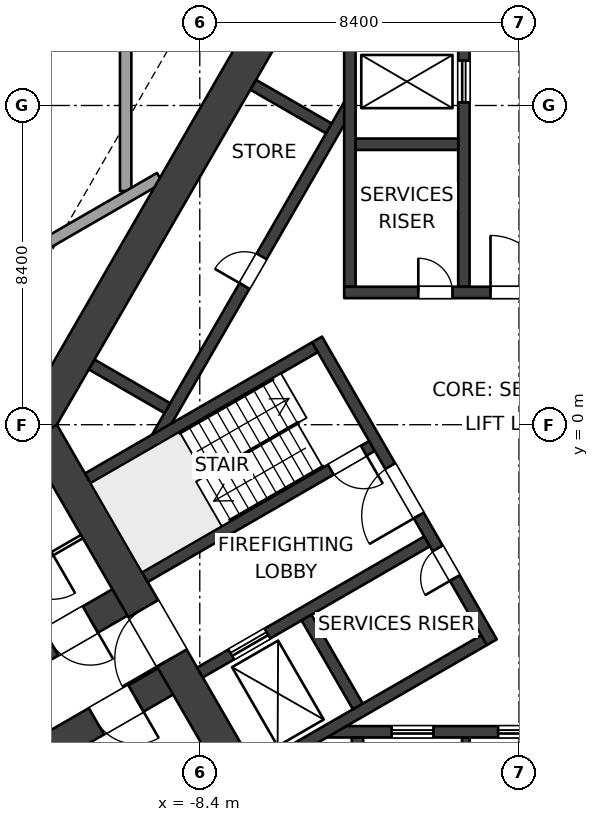
"""IFC4 building model, lengths in metres.
Left out: names, types, materials, properties, quantities, classifications, styles, units other than length and angle.
Written with IfcOpenShell. Run it as: python <this file> out.ifc"""

import sys

from ifc_helpers import new_model, si_unit, direction, frame, frame_2d, origin, place, context, subcontext, project, spatial, polyline, rectangle, outline, extrude, element, fill, save


model = new_model("IFC4")
c1 = context("Model", 3, precision=1e-05, world=origin(), true_north=direction((0.0, 1.0)))
c2 = subcontext(c1, "Body", "Model", "MODEL_VIEW")
j1 = project(units=[si_unit("LENGTHUNIT", "METRE"), si_unit("PLANEANGLEUNIT", "RADIAN")], contexts=[c1])
p1 = place(None, origin())
s1 = spatial("IfcSite", under=j1, at=p1, CompositionType="ELEMENT")
p2 = place(p1, origin())
s2 = spatial("IfcBuilding", under=s1, at=p2, CompositionType="ELEMENT")
p3 = place(p2, frame((0.0, 0.0, -10.5)))
s3 = spatial("IfcBuildingStorey", under=s2, at=p3, CompositionType="ELEMENT", Elevation=-10.5)
p4 = place(p3, frame((-6.47, -10.757, 0.0), z_axis=(0.0, 0.0, 1.0), x_axis=(-0.499997612506, 0.8660267822, 0.0)))
e1 = element("IfcWall", 1, at=p4, inside=s3, PredefinedType="SHEAR", context=c2, shape_type="SweptSolid", body=[
    extrude(rectangle(XDim=12.161, YDim=0.9, at=frame_2d((6.08, 0.0))), origin(), (0.0, 0.0, 1.0), 3.5),
])
p5 = place(p4, frame((5.33, 0.0, 0.0)))
e2 = element("IfcOpeningElement", 2, at=p5, cuts=e1, PredefinedType="OPENING", context=c2, shape_type="SweptSolid", body=[
    extrude(rectangle(XDim=1.5, YDim=2.1, at=frame_2d((0.75, 1.05))), frame((0.0, 0.46, 0.0), z_axis=(0.0, -1.0, 0.0), x_axis=(1.0, 0.0, 0.0)), (0.0, 0.0, 1.0), 0.92),
])
p6 = place(p3, origin())
e3 = element("IfcWall", 3, at=p6, inside=s3, PredefinedType="SHEAR", context=c2, shape_type="SweptSolid", body=[
    extrude(outline(polyline([(-6.6, 11.432), (-13.2, 0.0), (-12.94, -0.45), (-12.161, 0.0), (-6.08, 10.531), (-6.08, 11.432), (-6.6, 11.432)])), origin(), (0.0, 0.0, 1.0), 3.5),
])
p7 = place(p3, frame((-4.6, 3.48, 0.0), z_axis=(0.0, 0.0, 1.0), x_axis=(1.0, 0.0, 0.0)))
e4 = element("IfcWall", 4, at=p7, inside=s3, PredefinedType="SHEAR", context=c2, shape_type="SweptSolid", body=[
    extrude(rectangle(XDim=9.2, YDim=0.3, at=frame_2d((4.6, 0.0))), origin(), (0.0, 0.0, 1.0), 3.5),
])
p8 = place(p7, frame((3.85, 0.0, 0.0)))
e5 = element("IfcOpeningElement", 5, at=p8, cuts=e4, PredefinedType="OPENING", context=c2, shape_type="SweptSolid", body=[
    extrude(rectangle(XDim=1.5, YDim=2.1, at=frame_2d((0.75, 1.05))), frame((0.0, 0.16, 0.0), z_axis=(0.0, -1.0, 0.0), x_axis=(1.0, 0.0, 0.0)), (0.0, 0.0, 1.0), 0.32),
])
p9 = place(p7, frame((1.95, 0.0, 0.0)))
e6 = element("IfcOpeningElement", 6, at=p9, cuts=e4, PredefinedType="OPENING", context=c2, shape_type="SweptSolid", body=[
    extrude(rectangle(XDim=0.9, YDim=2.1, at=frame_2d((0.45, 1.05))), frame((0.0, 0.16, 0.0), z_axis=(0.0, -1.0, 0.0), x_axis=(1.0, 0.0, 0.0)), (0.0, 0.0, 1.0), 0.32),
])
p10 = place(p3, frame((-1.45, 3.63, 0.0), z_axis=(0.0, 0.0, 1.0), x_axis=(0.0, 1.0, 0.0)))
e7 = element("IfcWall", 7, at=p10, inside=s3, PredefinedType="SHEAR", context=c2, shape_type="SweptSolid", body=[
    extrude(rectangle(XDim=6.902, YDim=0.3, at=frame_2d((3.451, 0.0))), origin(), (0.0, 0.0, 1.0), 3.5),
])
p11 = place(p10, frame((4.85, 0.0, 0.0)))
e8 = element("IfcOpeningElement", 8, at=p11, cuts=e7, PredefinedType="OPENING", context=c2, shape_type="SweptSolid", body=[
    extrude(rectangle(XDim=1.1, YDim=2.1, at=frame_2d((0.55, 1.05))), frame((0.0, 0.16, 0.0), z_axis=(0.0, -1.0, 0.0), x_axis=(1.0, 0.0, 0.0)), (0.0, 0.0, 1.0), 0.32),
])
p12 = place(p3, frame((-4.45, 3.63, 0.0), z_axis=(0.0, 0.0, 1.0), x_axis=(0.0, 1.0, 0.0)))
e9 = element("IfcWall", 9, at=p12, inside=s3, PredefinedType="SHEAR", context=c2, shape_type="SweptSolid", body=[
    extrude(rectangle(XDim=6.902, YDim=0.3, at=frame_2d((3.451, 0.0))), origin(), (0.0, 0.0, 1.0), 3.5),
])
p13 = place(p3, frame((-4.3, 7.38, 0.0), z_axis=(0.0, 0.0, 1.0), x_axis=(1.0, 0.0, 0.0)))
e10 = element("IfcWall", 10, at=p13, inside=s3, PredefinedType="SHEAR", context=c2, shape_type="SweptSolid", body=[
    extrude(rectangle(XDim=2.7, YDim=0.3, at=frame_2d((1.35, 0.0))), origin(), (0.0, 0.0, 1.0), 3.5),
])
p14 = place(p3, frame((-0.714, -5.724, 0.0), z_axis=(0.0, 0.0, 1.0), x_axis=(-0.499995050369, 0.866028261437, 0.0)))
e11 = element("IfcWall", 11, at=p14, inside=s3, PredefinedType="SHEAR", context=c2, shape_type="SweptSolid", body=[
    extrude(rectangle(XDim=9.2, YDim=0.3, at=frame_2d((4.6, 0.0))), origin(), (0.0, 0.0, 1.0), 3.5),
])
p15 = place(p14, frame((3.85, 0.0, 0.0)))
e12 = element("IfcOpeningElement", 12, at=p15, cuts=e11, PredefinedType="OPENING", context=c2, shape_type="SweptSolid", body=[
    extrude(rectangle(XDim=1.5, YDim=2.1, at=frame_2d((0.75, 1.05))), frame((0.0, 0.16, 0.0), z_axis=(0.0, -1.0, 0.0), x_axis=(1.0, 0.0, 0.0)), (0.0, 0.0, 1.0), 0.32),
])
p16 = place(p14, frame((1.95, 0.0, 0.0)))
e13 = element("IfcOpeningElement", 13, at=p16, cuts=e11, PredefinedType="OPENING", context=c2, shape_type="SweptSolid", body=[
    extrude(rectangle(XDim=0.9, YDim=2.1, at=frame_2d((0.45, 1.05))), frame((0.0, 0.16, 0.0), z_axis=(0.0, -1.0, 0.0), x_axis=(1.0, 0.0, 0.0)), (0.0, 0.0, 1.0), 0.32),
])
p17 = place(p3, frame((-3.869, -0.559, 0.0), z_axis=(0.0, 0.0, 1.0), x_axis=(-0.86602711848, -0.499997030048, 0.0)))
e14 = element("IfcWall", 14, at=p17, inside=s3, PredefinedType="SHEAR", context=c2, shape_type="SweptSolid", body=[
    extrude(rectangle(XDim=6.901, YDim=0.3, at=frame_2d((3.451, 0.0))), origin(), (0.0, 0.0, 1.0), 3.5),
])
p18 = place(p17, frame((0.25, 0.0, 0.0)))
e15 = element("IfcOpeningElement", 15, at=p18, cuts=e14, PredefinedType="OPENING", context=c2, shape_type="SweptSolid", body=[
    extrude(rectangle(XDim=1.0, YDim=2.1, at=frame_2d((0.5, 1.05))), frame((0.0, 0.16, 0.0), z_axis=(0.0, -1.0, 0.0), x_axis=(1.0, 0.0, 0.0)), (0.0, 0.0, 1.0), 0.32),
])
p19 = place(p3, frame((-5.369, 2.039, 0.0), z_axis=(0.0, 0.0, 1.0), x_axis=(-0.86602711848, -0.499997030048, 0.0)))
e16 = element("IfcWall", 16, at=p19, inside=s3, PredefinedType="SHEAR", context=c2, shape_type="SweptSolid", body=[
    extrude(rectangle(XDim=6.901, YDim=0.3, at=frame_2d((3.451, 0.0))), origin(), (0.0, 0.0, 1.0), 3.5),
])
p20 = place(p3, frame((-2.419, -3.071, 0.0), z_axis=(0.0, 0.0, 1.0), x_axis=(-0.86602711848, -0.499997030048, 0.0)))
e17 = element("IfcWall", 17, at=p20, inside=s3, PredefinedType="SHEAR", context=c2, shape_type="SweptSolid", body=[
    extrude(rectangle(XDim=6.901, YDim=0.3, at=frame_2d((3.451, 0.0))), origin(), (0.0, 0.0, 1.0), 3.5),
])
p21 = place(p20, frame((4.85, 0.0, 0.0)))
e18 = element("IfcOpeningElement", 18, at=p21, cuts=e17, PredefinedType="OPENING", context=c2, shape_type="SweptSolid", body=[
    extrude(rectangle(XDim=1.1, YDim=2.1, at=frame_2d((0.55, 1.05))), frame((0.0, 0.16, 0.0), z_axis=(0.0, -1.0, 0.0), x_axis=(1.0, 0.0, 0.0)), (0.0, 0.0, 1.0), 0.32),
])
p22 = place(p3, frame((-0.919, -5.669, 0.0), z_axis=(0.0, 0.0, 1.0), x_axis=(-0.866011800373, -0.500023561059, 0.0)))
e19 = element("IfcWall", 19, at=p22, inside=s3, PredefinedType="SHEAR", context=c2, shape_type="SweptSolid", body=[
    extrude(rectangle(XDim=6.902, YDim=0.3, at=frame_2d((3.451, 0.0))), origin(), (0.0, 0.0, 1.0), 3.5),
])
p23 = place(p3, frame((-4.241, -7.414, 0.0), z_axis=(0.0, 0.0, 1.0), x_axis=(-0.500048589285, 0.86599734893, 0.0)))
e20 = element("IfcWall", 20, at=p23, inside=s3, PredefinedType="SHEAR", context=c2, shape_type="SweptSolid", body=[
    extrude(rectangle(XDim=2.7, YDim=0.3, at=frame_2d((1.35, 0.0))), origin(), (0.0, 0.0, 1.0), 3.5),
])
p24 = place(p3, frame((5.098, -8.082, 0.0), z_axis=(0.0, 0.0, 1.0), x_axis=(-1.0, 0.0, 0.0)))
e21 = element("IfcWall", 21, at=p24, inside=s3, PredefinedType="SHEAR", context=c2, shape_type="SweptSolid", body=[
    extrude(rectangle(XDim=10.195, YDim=0.3, at=frame_2d((5.098, 0.0))), origin(), (0.0, 0.0, 1.0), 3.5),
])
p25 = place(p24, frame((1.748, 0.0, 0.0)))
e22 = element("IfcOpeningElement", 22, at=p25, cuts=e21, PredefinedType="OPENING", context=c2, shape_type="SweptSolid", body=[
    extrude(rectangle(XDim=1.1, YDim=2.1, at=frame_2d((0.55, 1.05))), frame((0.0, 0.16, 0.0), z_axis=(0.0, -1.0, 0.0), x_axis=(1.0, 0.0, 0.0)), (0.0, 0.0, 1.0), 0.32),
])
p26 = place(p24, frame((4.548, 0.0, 0.0)))
e23 = element("IfcOpeningElement", 23, at=p26, cuts=e21, PredefinedType="OPENING", context=c2, shape_type="SweptSolid", body=[
    extrude(rectangle(XDim=1.1, YDim=2.1, at=frame_2d((0.55, 1.05))), frame((0.0, 0.16, 0.0), z_axis=(0.0, -1.0, 0.0), x_axis=(1.0, 0.0, 0.0)), (0.0, 0.0, 1.0), 0.32),
])
p27 = place(p24, frame((7.348, 0.0, 0.0)))
e24 = element("IfcOpeningElement", 24, at=p27, cuts=e21, PredefinedType="OPENING", context=c2, shape_type="SweptSolid", body=[
    extrude(rectangle(XDim=1.1, YDim=2.1, at=frame_2d((0.55, 1.05))), frame((0.0, 0.16, 0.0), z_axis=(0.0, -1.0, 0.0), x_axis=(1.0, 0.0, 0.0)), (0.0, 0.0, 1.0), 0.32),
])
p28 = place(p3, frame((-4.25, -8.231, 0.0), z_axis=(0.0, 0.0, 1.0), x_axis=(0.0, -1.0, 0.0)))
e25 = element("IfcWall", 25, at=p28, inside=s3, PredefinedType="SHEAR", context=c2, shape_type="SweptSolid", body=[
    extrude(rectangle(XDim=2.3, YDim=0.3, at=frame_2d((1.15, 0.0))), origin(), (0.0, 0.0, 1.0), 3.5),
])
p29 = place(p3, frame((-1.4, -8.231, 0.0), z_axis=(0.0, 0.0, 1.0), x_axis=(0.0, -1.0, 0.0)))
e26 = element("IfcWall", 26, at=p29, inside=s3, PredefinedType="SHEAR", context=c2, shape_type="SweptSolid", body=[
    extrude(rectangle(XDim=2.3, YDim=0.2, at=frame_2d((1.15, 0.0))), origin(), (0.0, 0.0, 1.0), 3.5),
])
p30 = place(p3, frame((-9.548, -0.374, 0.0), z_axis=(0.0, 0.0, 1.0), x_axis=(0.500002290144, 0.866024081565, 0.0)))
e27 = element("IfcWall", 27, at=p30, inside=s3, PredefinedType="SHEAR", context=c2, shape_type="SweptSolid", body=[
    extrude(rectangle(XDim=10.195, YDim=0.3, at=frame_2d((5.098, 0.0))), origin(), (0.0, 0.0, 1.0), 3.5),
])
p31 = place(p30, frame((4.648, 0.0, 0.0)))
e28 = element("IfcOpeningElement", 28, at=p31, cuts=e27, PredefinedType="OPENING", context=c2, shape_type="SweptSolid", body=[
    extrude(rectangle(XDim=0.9, YDim=2.1, at=frame_2d((0.45, 1.05))), frame((0.0, 0.16, 0.0), z_axis=(0.0, -1.0, 0.0), x_axis=(1.0, 0.0, 0.0)), (0.0, 0.0, 1.0), 0.32),
])
for number, where, z_axis, x_axis in (
    (29, (-9.254, 0.435, 0.0), (0.0, 0.0, 1.0), (-0.866, 0.5, 0.0)),
    (30, (-5.004, 7.796, 0.0), (0.0, 0.0, 1.0), (-0.866, 0.5, 0.0)),
):
    element("IfcWall", number, at=place(p3, frame(where, z_axis=z_axis, x_axis=x_axis)), inside=s3, PredefinedType="SHEAR", context=c2, shape_type="SweptSolid", body=[
        extrude(rectangle(XDim=2.3, YDim=0.3, at=frame_2d((1.15, 0.0))), origin(), (0.0, 0.0, 1.0), 3.5),
    ])
p32 = place(p3, frame((-8.91, -6.53, 0.0), z_axis=(0.0, 0.0, 1.0), x_axis=(-0.866025284237, -0.500000207062, 0.0)))
e31 = element("IfcWall", 31, at=p32, inside=s3, PredefinedType="SHEAR", context=c2, shape_type="SweptSolid", body=[
    extrude(rectangle(XDim=36.75, YDim=0.8, at=frame_2d((18.375, 0.0))), origin(), (0.0, 0.0, 1.0), 3.5),
])
p33 = place(p32, frame((1.35, 0.0, 0.0)))
e32 = element("IfcOpeningElement", 32, at=p33, cuts=e31, PredefinedType="OPENING", context=c2, shape_type="SweptSolid", body=[
    extrude(rectangle(XDim=1.2, YDim=2.1, at=frame_2d((0.6, 1.05))), frame((0.0, 0.41, 0.0), z_axis=(0.0, -1.0, 0.0), x_axis=(1.0, 0.0, 0.0)), (0.0, 0.0, 1.0), 0.82),
])
p34 = place(p3, frame((-10.11, -4.451, 0.0), z_axis=(0.0, 0.0, 1.0), x_axis=(-0.866025284237, -0.500000207062, 0.0)))
e33 = element("IfcWall", 33, at=p34, inside=s3, PredefinedType="SHEAR", context=c2, shape_type="SweptSolid", body=[
    extrude(rectangle(XDim=36.75, YDim=0.8, at=frame_2d((18.375, 0.0))), origin(), (0.0, 0.0, 1.0), 3.5),
])
p35 = place(p34, frame((1.35, 0.0, 0.0)))
e34 = element("IfcOpeningElement", 34, at=p35, cuts=e33, PredefinedType="OPENING", context=c2, shape_type="SweptSolid", body=[
    extrude(rectangle(XDim=1.2, YDim=2.1, at=frame_2d((0.6, 1.05))), frame((0.0, 0.41, 0.0), z_axis=(0.0, -1.0, 0.0), x_axis=(1.0, 0.0, 0.0)), (0.0, 0.0, 1.0), 0.82),
])
p36 = place(p3, frame((-11.5, -2.945, 0.0), z_axis=(0.0, 0.0, 1.0), x_axis=(-0.866034573852, -0.49998411664, 0.0)))
e35 = element("IfcWall", 35, at=p36, inside=s3, PredefinedType="PARTITIONING", context=c2, shape_type="SweptSolid", body=[
    extrude(rectangle(XDim=2.8, YDim=0.1, at=frame_2d((1.4, 0.0))), origin(), (0.0, 0.0, 1.0), 3.2),
])
p37 = place(p36, frame((0.9, 0.0, 0.0)))
e36 = element("IfcOpeningElement", 36, at=p37, cuts=e35, PredefinedType="OPENING", context=c2, shape_type="SweptSolid", body=[
    extrude(rectangle(XDim=1.2, YDim=2.1, at=frame_2d((0.6, 1.05))), frame((0.0, 0.06, 0.0), z_axis=(0.0, -1.0, 0.0), x_axis=(1.0, 0.0, 0.0)), (0.0, 0.0, 1.0), 0.12),
])
p38 = place(p3, frame((-10.35, 6.149, 0.0), z_axis=(0.0, 0.0, 1.0), x_axis=(0.0, 1.0, 0.0)))
e37 = element("IfcWall", 37, at=p38, inside=s3, PredefinedType="SOLIDWALL", context=c2, shape_type="SweptSolid", body=[
    extrude(rectangle(XDim=41.883, YDim=0.3, at=frame_2d((20.941, 0.0))), origin(), (0.0, 0.0, 1.0), 3.2),
])
p39 = place(p38, frame((25.383, 0.0, 0.0)))
e38 = element("IfcOpeningElement", 38, at=p39, cuts=e37, PredefinedType="OPENING", context=c2, shape_type="SweptSolid", body=[
    extrude(rectangle(XDim=1.8, YDim=2.4, at=frame_2d((0.9, 1.2))), frame((0.0, 0.16, 0.0), z_axis=(0.0, -1.0, 0.0), x_axis=(1.0, 0.0, 0.0)), (0.0, 0.0, 1.0), 0.32),
])
p40 = place(p3, frame((-9.45, 6.495, 0.0), z_axis=(0.0, 0.0, 1.0), x_axis=(-0.866025301493, -0.500000177174, 0.0)))
e39 = element("IfcWall", 39, at=p40, inside=s3, PredefinedType="SOLIDWALL", context=c2, shape_type="SweptSolid", body=[
    extrude(rectangle(XDim=43.095, YDim=0.3, at=frame_2d((21.548, 0.0))), origin(), (0.0, 0.0, 1.0), 3.2),
])
p41 = place(p40, frame((26.595, 0.0, 0.0)))
e40 = element("IfcOpeningElement", 40, at=p41, cuts=e39, PredefinedType="OPENING", context=c2, shape_type="SweptSolid", body=[
    extrude(rectangle(XDim=1.8, YDim=2.4, at=frame_2d((0.9, 1.2))), frame((0.0, 0.16, 0.0), z_axis=(0.0, -1.0, 0.0), x_axis=(1.0, 0.0, 0.0)), (0.0, 0.0, 1.0), 0.32),
])
p42 = place(p26, origin())
e41 = element("IfcDoor", 41, at=p42, inside=s3, OperationType="DOUBLE_DOOR_SLIDING", PredefinedType="DOOR", context=c2, shape_type="SweptSolid", body=[
    extrude(rectangle(XDim=1.1, YDim=2.1, at=frame_2d((0.55, 1.05))), frame((0.0, 0.025, 0.0), z_axis=(0.0, -1.0, 0.0), x_axis=(1.0, 0.0, 0.0)), (0.0, 0.0, 1.0), 0.05),
])
fill(e23, e41)
p43 = place(p27, origin())
e42 = element("IfcDoor", 42, at=p43, inside=s3, OperationType="DOUBLE_DOOR_SLIDING", PredefinedType="DOOR", context=c2, shape_type="SweptSolid", body=[
    extrude(rectangle(XDim=1.1, YDim=2.1, at=frame_2d((0.55, 1.05))), frame((0.0, 0.025, 0.0), z_axis=(0.0, -1.0, 0.0), x_axis=(1.0, 0.0, 0.0)), (0.0, 0.0, 1.0), 0.05),
])
fill(e24, e42)
p44 = place(p11, origin())
e43 = element("IfcDoor", 43, at=p44, inside=s3, OperationType="DOUBLE_DOOR_SLIDING", PredefinedType="DOOR", context=c2, shape_type="SweptSolid", body=[
    extrude(rectangle(XDim=1.1, YDim=2.1, at=frame_2d((0.55, 1.05))), frame((0.0, 0.025, 0.0), z_axis=(0.0, -1.0, 0.0), x_axis=(1.0, 0.0, 0.0)), (0.0, 0.0, 1.0), 0.05),
])
fill(e8, e43)
p45 = place(p21, origin())
e44 = element("IfcDoor", 44, at=p45, inside=s3, OperationType="DOUBLE_DOOR_SLIDING", PredefinedType="DOOR", context=c2, shape_type="SweptSolid", body=[
    extrude(rectangle(XDim=1.1, YDim=2.1, at=frame_2d((0.55, 1.05))), frame((0.0, 0.025, 0.0), z_axis=(0.0, -1.0, 0.0), x_axis=(1.0, 0.0, 0.0)), (0.0, 0.0, 1.0), 0.05),
])
fill(e18, e44)
p46 = place(p8, origin())
e45 = element("IfcDoor", 45, at=p46, inside=s3, OperationType="DOUBLE_DOOR_DOUBLE_SWING", PredefinedType="DOOR", context=c2, shape_type="SweptSolid", body=[
    extrude(rectangle(XDim=1.5, YDim=2.1, at=frame_2d((0.75, 1.05))), frame((0.0, 0.025, 0.0), z_axis=(0.0, -1.0, 0.0), x_axis=(1.0, 0.0, 0.0)), (0.0, 0.0, 1.0), 0.05),
])
fill(e5, e45)
p47 = place(p9, origin())
e46 = element("IfcDoor", 46, at=p47, inside=s3, OperationType="SINGLE_SWING_LEFT", PredefinedType="DOOR", context=c2, shape_type="SweptSolid", body=[
    extrude(rectangle(XDim=0.9, YDim=2.1, at=frame_2d((0.45, 1.05))), frame((0.0, 0.025, 0.0), z_axis=(0.0, -1.0, 0.0), x_axis=(1.0, 0.0, 0.0)), (0.0, 0.0, 1.0), 0.05),
])
fill(e6, e46)
p48 = place(p15, origin())
e47 = element("IfcDoor", 47, at=p48, inside=s3, OperationType="DOUBLE_DOOR_DOUBLE_SWING", PredefinedType="DOOR", context=c2, shape_type="SweptSolid", body=[
    extrude(rectangle(XDim=1.5, YDim=2.1, at=frame_2d((0.75, 1.05))), frame((0.0, 0.025, 0.0), z_axis=(0.0, -1.0, 0.0), x_axis=(1.0, 0.0, 0.0)), (0.0, 0.0, 1.0), 0.05),
])
fill(e12, e47)
p49 = place(p16, origin())
e48 = element("IfcDoor", 48, at=p49, inside=s3, OperationType="SINGLE_SWING_LEFT", PredefinedType="DOOR", context=c2, shape_type="SweptSolid", body=[
    extrude(rectangle(XDim=0.9, YDim=2.1, at=frame_2d((0.45, 1.05))), frame((0.0, 0.025, 0.0), z_axis=(0.0, -1.0, 0.0), x_axis=(1.0, 0.0, 0.0)), (0.0, 0.0, 1.0), 0.05),
])
fill(e13, e48)
p50 = place(p18, origin())
e49 = element("IfcDoor", 49, at=p50, inside=s3, OperationType="SINGLE_SWING_LEFT", PredefinedType="DOOR", context=c2, shape_type="SweptSolid", body=[
    extrude(rectangle(XDim=1.0, YDim=2.1, at=frame_2d((0.5, 1.05))), frame((0.0, 0.025, 0.0), z_axis=(0.0, -1.0, 0.0), x_axis=(1.0, 0.0, 0.0)), (0.0, 0.0, 1.0), 0.05),
])
fill(e15, e49)
p51 = place(p5, origin())
e50 = element("IfcDoor", 50, at=p51, inside=s3, OperationType="DOUBLE_DOOR_DOUBLE_SWING", PredefinedType="DOOR", context=c2, shape_type="SweptSolid", body=[
    extrude(rectangle(XDim=1.5, YDim=2.1, at=frame_2d((0.75, 1.05))), frame((0.0, 0.025, 0.0), z_axis=(0.0, -1.0, 0.0), x_axis=(1.0, 0.0, 0.0)), (0.0, 0.0, 1.0), 0.05),
])
fill(e2, e50)
p52 = place(p31, origin())
e51 = element("IfcDoor", 51, at=p52, inside=s3, OperationType="SINGLE_SWING_LEFT", PredefinedType="DOOR", context=c2, shape_type="SweptSolid", body=[
    extrude(rectangle(XDim=0.9, YDim=2.1, at=frame_2d((0.45, 1.05))), frame((0.0, 0.025, 0.0), z_axis=(0.0, -1.0, 0.0), x_axis=(1.0, 0.0, 0.0)), (0.0, 0.0, 1.0), 0.05),
])
fill(e28, e51)
p53 = place(p33, origin())
e52 = element("IfcDoor", 52, at=p53, inside=s3, OperationType="DOUBLE_SWING_LEFT", PredefinedType="DOOR", context=c2, shape_type="SweptSolid", body=[
    extrude(rectangle(XDim=1.2, YDim=2.1, at=frame_2d((0.6, 1.05))), frame((0.0, 0.025, 0.0), z_axis=(0.0, -1.0, 0.0), x_axis=(1.0, 0.0, 0.0)), (0.0, 0.0, 1.0), 0.05),
])
fill(e32, e52)
p54 = place(p35, origin())
e53 = element("IfcDoor", 53, at=p54, inside=s3, OperationType="DOUBLE_SWING_LEFT", PredefinedType="DOOR", context=c2, shape_type="SweptSolid", body=[
    extrude(rectangle(XDim=1.2, YDim=2.1, at=frame_2d((0.6, 1.05))), frame((0.0, 0.025, 0.0), z_axis=(0.0, -1.0, 0.0), x_axis=(1.0, 0.0, 0.0)), (0.0, 0.0, 1.0), 0.05),
])
fill(e34, e53)
p55 = place(p37, origin())
e54 = element("IfcDoor", 54, at=p55, inside=s3, OperationType="DOUBLE_SWING_LEFT", PredefinedType="DOOR", context=c2, shape_type="SweptSolid", body=[
    extrude(rectangle(XDim=1.2, YDim=2.1, at=frame_2d((0.6, 1.05))), frame((0.0, 0.025, 0.0), z_axis=(0.0, -1.0, 0.0), x_axis=(1.0, 0.0, 0.0)), (0.0, 0.0, 1.0), 0.05),
])
fill(e36, e54)
save(model, sys.argv[1])
